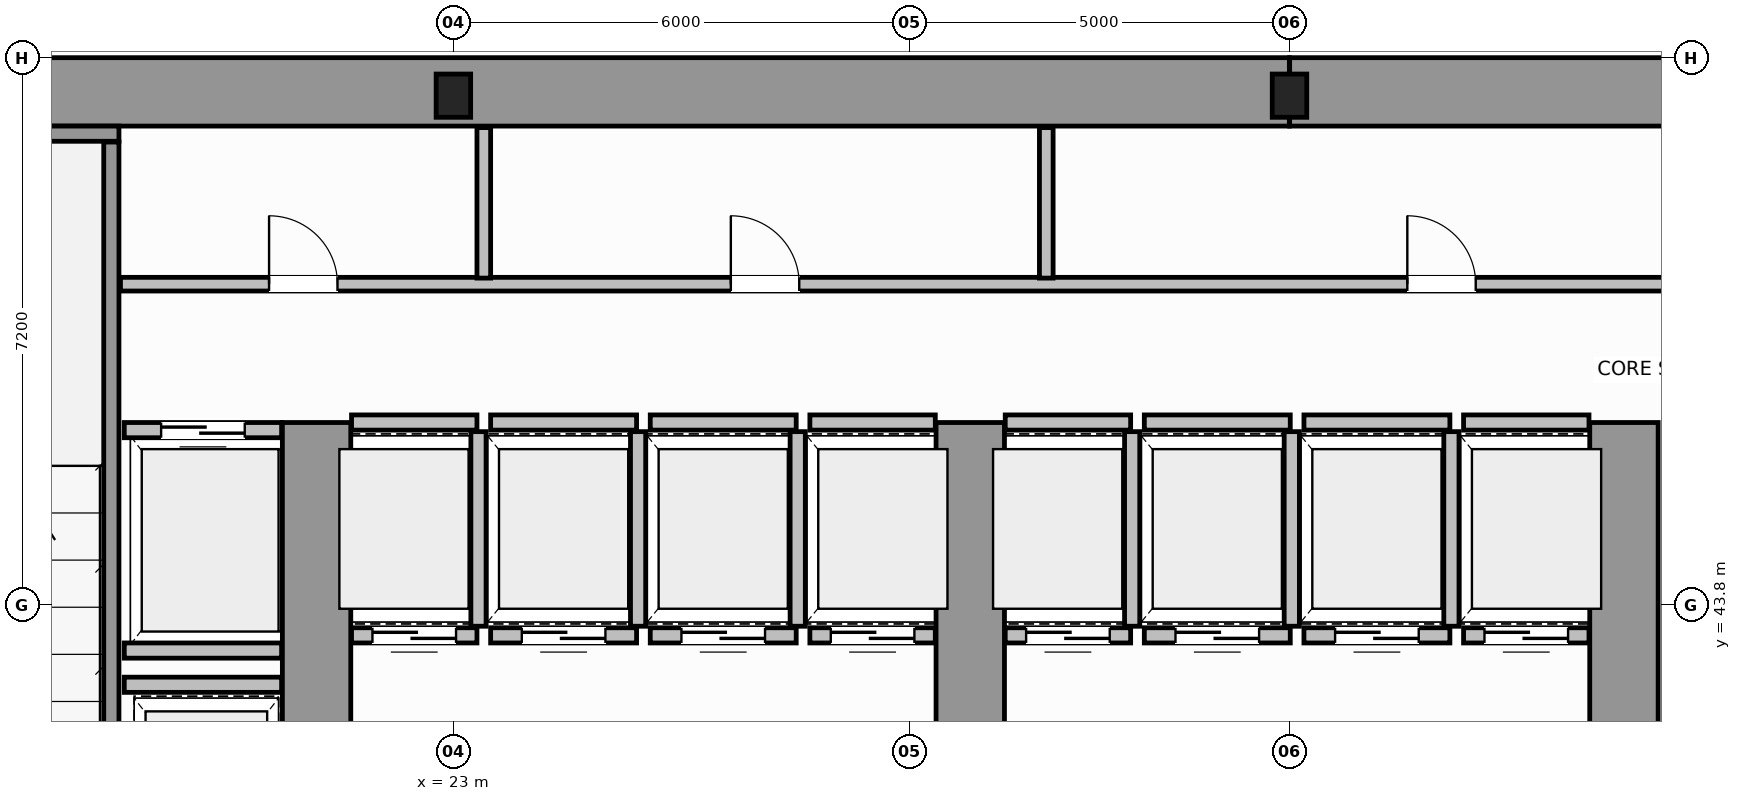
"""IFC4 building model, lengths in metres.
Left out: names, types, materials, properties, quantities, classifications, styles, units other than length and angle.
Written with IfcOpenShell. Run it as: python <this file> out.ifc"""

import sys

from ifc_helpers import new_model, si_unit, direction, frame, frame_2d, origin, origin_2d, place, context, subcontext, project, spatial, rectangle, i_section, extrude, source, transform, mapped, element, fill, save


model = new_model("IFC4")
c1 = context("Model", 3, precision=1e-05, world=origin(), true_north=direction((0.0, 1.0)))
c2 = subcontext(c1, "Body", "Model", "MODEL_VIEW")
j1 = project(units=[si_unit("LENGTHUNIT", "METRE"), si_unit("PLANEANGLEUNIT", "RADIAN")], contexts=[c1])
p1 = place(None, origin())
s1 = spatial("IfcSite", under=j1, at=p1, CompositionType="ELEMENT")
p2 = place(p1, origin())
s2 = spatial("IfcBuilding", under=s1, at=p2, CompositionType="ELEMENT")
p3 = place(p2, frame((0.0, 0.0, 5.6)))
s3 = spatial("IfcBuildingStorey", under=s2, at=p3, CompositionType="ELEMENT", Elevation=5.6)
m1 = source(origin(), c2, "Body", "SweptSolid", [
    extrude(i_section(OverallWidth=0.454, OverallDepth=0.569, WebThickness=0.078, FlangeThickness=0.08, FilletRadius=0.015, at=origin_2d()), origin(), (0.0, 0.0, 1.0), 4.4),
])
for number, where, z_axis, x_axis in (
    (1, (23.0, 50.5, 0.0), (0.0, 0.0, 1.0), (1.0, 0.0, 0.0)),
    (2, (34.0, 50.5, 0.0), (0.0, 0.0, 1.0), (1.0, 0.0, 0.0)),
):
    element("IfcColumn", number, at=place(p3, frame(where, z_axis=z_axis, x_axis=x_axis)), inside=s3, PredefinedType="COLUMN", context=c2, shape_type="MappedRepresentation", body=[
        mapped(m1, transform((0.0, 0.0, 0.0), scale=1.0)),
    ])
for number, where, z_axis, x_axis in (
    (3, (14.454, 50.55, 0.0), (0.0, 0.0, 1.0), (1.0, 0.0, 0.0)),
    (4, (34.002, 50.55, 0.0), (0.0, 0.0, 1.0), (1.0, 0.0, 0.0)),
):
    element("IfcWall", number, at=place(p3, frame(where, z_axis=z_axis, x_axis=x_axis)), inside=s3, PredefinedType="SHEAR", context=c2, shape_type="SweptSolid", body=[
        extrude(rectangle(XDim=19.544, YDim=0.9, at=frame_2d((9.772, 0.0))), origin(), (0.0, 0.0, 1.0), 4.4),
    ])
for number, where, z_axis, x_axis in (
    (5, (21.2, 36.97, 0.0), (0.0, 0.0, 1.0), (0.0, 1.0, 0.0)),
    (6, (29.8, 36.97, 0.0), (0.0, 0.0, 1.0), (0.0, 1.0, 0.0)),
    (7, (38.4, 36.97, 0.0), (0.0, 0.0, 1.0), (0.0, 1.0, 0.0)),
):
    element("IfcWall", number, at=place(p3, frame(where, z_axis=z_axis, x_axis=x_axis)), inside=s3, PredefinedType="SHEAR", context=c2, shape_type="SweptSolid", body=[
        extrude(rectangle(XDim=9.23, YDim=0.9, at=frame_2d((4.615, 0.0))), origin(), (0.0, 0.0, 1.0), 4.4),
    ])
p4 = place(p3, frame((14.45, 50.0, 0.0), z_axis=(0.0, 0.0, 1.0), x_axis=(1.0, 0.0, 0.0)))
e8 = element("IfcWall", 8, at=p4, inside=s3, PredefinedType="SOLIDWALL", context=c2, shape_type="SweptSolid", body=[
    extrude(rectangle(XDim=4.15, YDim=0.2, at=frame_2d((2.075, 0.0))), origin(), (0.0, 0.0, 1.0), 4.4),
])
p5 = place(p3, frame((18.5, 39.96, 0.0), z_axis=(0.0, 0.0, 1.0), x_axis=(0.0, 1.0, 0.0)))
e9 = element("IfcWall", 9, at=p5, inside=s3, PredefinedType="SOLIDWALL", context=c2, shape_type="SweptSolid", body=[
    extrude(rectangle(XDim=9.93, YDim=0.2, at=frame_2d((4.965, 0.0))), origin(), (0.0, 0.0, 1.0), 4.4),
])
p6 = place(p3, frame((21.66, 43.4, 0.0), z_axis=(0.0, 0.0, 1.0), x_axis=(1.0, 0.0, 0.0)))
e10 = element("IfcWall", 10, at=p6, inside=s3, PredefinedType="SOLIDWALL", context=c2, shape_type="SweptSolid", body=[
    extrude(rectangle(XDim=1.65, YDim=0.2, at=frame_2d((0.825, 0.0))), origin(), (0.0, 0.0, 1.0), 4.12),
])
p7 = place(p6, frame((0.275, 0.0, 0.0)))
e11 = element("IfcOpeningElement", 11, at=p7, cuts=e10, PredefinedType="OPENING", context=c2, shape_type="SweptSolid", body=[
    extrude(rectangle(XDim=1.1, YDim=2.15, at=frame_2d((0.55, 1.075))), frame((0.0, 0.11, 0.0), z_axis=(0.0, -1.0, 0.0), x_axis=(1.0, 0.0, 0.0)), (0.0, 0.0, 1.0), 0.22),
])
p8 = place(p3, frame((21.66, 46.2, 0.0), z_axis=(0.0, 0.0, 1.0), x_axis=(1.0, 0.0, 0.0)))
e12 = element("IfcWall", 12, at=p8, inside=s3, PredefinedType="SOLIDWALL", context=c2, shape_type="SweptSolid", body=[
    extrude(rectangle(XDim=1.65, YDim=0.2, at=frame_2d((0.825, 0.0))), origin(), (0.0, 0.0, 1.0), 4.12),
])
p9 = place(p3, frame((23.33, 43.52, 0.0), z_axis=(0.0, 0.0, 1.0), x_axis=(0.0, 1.0, 0.0)))
e13 = element("IfcWall", 13, at=p9, inside=s3, PredefinedType="SOLIDWALL", context=c2, shape_type="SweptSolid", body=[
    extrude(rectangle(XDim=2.56, YDim=0.2, at=frame_2d((1.28, 0.0))), origin(), (0.0, 0.0, 1.0), 4.12),
])
p10 = place(p3, frame((23.49, 43.4, 0.0), z_axis=(0.0, 0.0, 1.0), x_axis=(1.0, 0.0, 0.0)))
e14 = element("IfcWall", 14, at=p10, inside=s3, PredefinedType="SOLIDWALL", context=c2, shape_type="SweptSolid", body=[
    extrude(rectangle(XDim=1.92, YDim=0.2, at=frame_2d((0.96, 0.0))), origin(), (0.0, 0.0, 1.0), 4.12),
])
p11 = place(p10, frame((0.41, 0.0, 0.0)))
e15 = element("IfcOpeningElement", 15, at=p11, cuts=e14, PredefinedType="OPENING", context=c2, shape_type="SweptSolid", body=[
    extrude(rectangle(XDim=1.1, YDim=2.15, at=frame_2d((0.55, 1.075))), frame((0.0, 0.11, 0.0), z_axis=(0.0, -1.0, 0.0), x_axis=(1.0, 0.0, 0.0)), (0.0, 0.0, 1.0), 0.22),
])
p12 = place(p3, frame((23.49, 46.2, 0.0), z_axis=(0.0, 0.0, 1.0), x_axis=(1.0, 0.0, 0.0)))
e16 = element("IfcWall", 16, at=p12, inside=s3, PredefinedType="SOLIDWALL", context=c2, shape_type="SweptSolid", body=[
    extrude(rectangle(XDim=1.92, YDim=0.2, at=frame_2d((0.96, 0.0))), origin(), (0.0, 0.0, 1.0), 4.12),
])
p13 = place(p3, frame((25.43, 43.52, 0.0), z_axis=(0.0, 0.0, 1.0), x_axis=(0.0, 1.0, 0.0)))
e17 = element("IfcWall", 17, at=p13, inside=s3, PredefinedType="SOLIDWALL", context=c2, shape_type="SweptSolid", body=[
    extrude(rectangle(XDim=2.56, YDim=0.2, at=frame_2d((1.28, 0.0))), origin(), (0.0, 0.0, 1.0), 4.12),
])
p14 = place(p3, frame((25.59, 43.4, 0.0), z_axis=(0.0, 0.0, 1.0), x_axis=(1.0, 0.0, 0.0)))
e18 = element("IfcWall", 18, at=p14, inside=s3, PredefinedType="SOLIDWALL", context=c2, shape_type="SweptSolid", body=[
    extrude(rectangle(XDim=1.92, YDim=0.2, at=frame_2d((0.96, 0.0))), origin(), (0.0, 0.0, 1.0), 4.12),
])
p15 = place(p14, frame((0.41, 0.0, 0.0)))
e19 = element("IfcOpeningElement", 19, at=p15, cuts=e18, PredefinedType="OPENING", context=c2, shape_type="SweptSolid", body=[
    extrude(rectangle(XDim=1.1, YDim=2.15, at=frame_2d((0.55, 1.075))), frame((0.0, 0.11, 0.0), z_axis=(0.0, -1.0, 0.0), x_axis=(1.0, 0.0, 0.0)), (0.0, 0.0, 1.0), 0.22),
])
p16 = place(p3, frame((25.59, 46.2, 0.0), z_axis=(0.0, 0.0, 1.0), x_axis=(1.0, 0.0, 0.0)))
e20 = element("IfcWall", 20, at=p16, inside=s3, PredefinedType="SOLIDWALL", context=c2, shape_type="SweptSolid", body=[
    extrude(rectangle(XDim=1.92, YDim=0.2, at=frame_2d((0.96, 0.0))), origin(), (0.0, 0.0, 1.0), 4.12),
])
p17 = place(p3, frame((27.53, 43.52, 0.0), z_axis=(0.0, 0.0, 1.0), x_axis=(0.0, 1.0, 0.0)))
e21 = element("IfcWall", 21, at=p17, inside=s3, PredefinedType="SOLIDWALL", context=c2, shape_type="SweptSolid", body=[
    extrude(rectangle(XDim=2.56, YDim=0.2, at=frame_2d((1.28, 0.0))), origin(), (0.0, 0.0, 1.0), 4.12),
])
p18 = place(p3, frame((27.69, 43.4, 0.0), z_axis=(0.0, 0.0, 1.0), x_axis=(1.0, 0.0, 0.0)))
e22 = element("IfcWall", 22, at=p18, inside=s3, PredefinedType="SOLIDWALL", context=c2, shape_type="SweptSolid", body=[
    extrude(rectangle(XDim=1.65, YDim=0.2, at=frame_2d((0.825, 0.0))), origin(), (0.0, 0.0, 1.0), 4.12),
])
p19 = place(p18, frame((0.275, 0.0, 0.0)))
e23 = element("IfcOpeningElement", 23, at=p19, cuts=e22, PredefinedType="OPENING", context=c2, shape_type="SweptSolid", body=[
    extrude(rectangle(XDim=1.1, YDim=2.15, at=frame_2d((0.55, 1.075))), frame((0.0, 0.11, 0.0), z_axis=(0.0, -1.0, 0.0), x_axis=(1.0, 0.0, 0.0)), (0.0, 0.0, 1.0), 0.22),
])
p20 = place(p3, frame((27.69, 46.2, 0.0), z_axis=(0.0, 0.0, 1.0), x_axis=(1.0, 0.0, 0.0)))
e24 = element("IfcWall", 24, at=p20, inside=s3, PredefinedType="SOLIDWALL", context=c2, shape_type="SweptSolid", body=[
    extrude(rectangle(XDim=1.65, YDim=0.2, at=frame_2d((0.825, 0.0))), origin(), (0.0, 0.0, 1.0), 4.12),
])
p21 = place(p3, frame((30.26, 43.4, 0.0), z_axis=(0.0, 0.0, 1.0), x_axis=(1.0, 0.0, 0.0)))
e25 = element("IfcWall", 25, at=p21, inside=s3, PredefinedType="SOLIDWALL", context=c2, shape_type="SweptSolid", body=[
    extrude(rectangle(XDim=1.65, YDim=0.2, at=frame_2d((0.825, 0.0))), origin(), (0.0, 0.0, 1.0), 4.12),
])
p22 = place(p21, frame((0.275, 0.0, 0.0)))
e26 = element("IfcOpeningElement", 26, at=p22, cuts=e25, PredefinedType="OPENING", context=c2, shape_type="SweptSolid", body=[
    extrude(rectangle(XDim=1.1, YDim=2.15, at=frame_2d((0.55, 1.075))), frame((0.0, 0.11, 0.0), z_axis=(0.0, -1.0, 0.0), x_axis=(1.0, 0.0, 0.0)), (0.0, 0.0, 1.0), 0.22),
])
p23 = place(p3, frame((30.26, 46.2, 0.0), z_axis=(0.0, 0.0, 1.0), x_axis=(1.0, 0.0, 0.0)))
e27 = element("IfcWall", 27, at=p23, inside=s3, PredefinedType="SOLIDWALL", context=c2, shape_type="SweptSolid", body=[
    extrude(rectangle(XDim=1.65, YDim=0.2, at=frame_2d((0.825, 0.0))), origin(), (0.0, 0.0, 1.0), 4.12),
])
p24 = place(p3, frame((31.93, 43.52, 0.0), z_axis=(0.0, 0.0, 1.0), x_axis=(0.0, 1.0, 0.0)))
e28 = element("IfcWall", 28, at=p24, inside=s3, PredefinedType="SOLIDWALL", context=c2, shape_type="SweptSolid", body=[
    extrude(rectangle(XDim=2.56, YDim=0.2, at=frame_2d((1.28, 0.0))), origin(), (0.0, 0.0, 1.0), 4.12),
])
p25 = place(p3, frame((32.09, 43.4, 0.0), z_axis=(0.0, 0.0, 1.0), x_axis=(1.0, 0.0, 0.0)))
e29 = element("IfcWall", 29, at=p25, inside=s3, PredefinedType="SOLIDWALL", context=c2, shape_type="SweptSolid", body=[
    extrude(rectangle(XDim=1.92, YDim=0.2, at=frame_2d((0.96, 0.0))), origin(), (0.0, 0.0, 1.0), 4.12),
])
p26 = place(p25, frame((0.41, 0.0, 0.0)))
e30 = element("IfcOpeningElement", 30, at=p26, cuts=e29, PredefinedType="OPENING", context=c2, shape_type="SweptSolid", body=[
    extrude(rectangle(XDim=1.1, YDim=2.15, at=frame_2d((0.55, 1.075))), frame((0.0, 0.11, 0.0), z_axis=(0.0, -1.0, 0.0), x_axis=(1.0, 0.0, 0.0)), (0.0, 0.0, 1.0), 0.22),
])
p27 = place(p3, frame((32.09, 46.2, 0.0), z_axis=(0.0, 0.0, 1.0), x_axis=(1.0, 0.0, 0.0)))
e31 = element("IfcWall", 31, at=p27, inside=s3, PredefinedType="SOLIDWALL", context=c2, shape_type="SweptSolid", body=[
    extrude(rectangle(XDim=1.92, YDim=0.2, at=frame_2d((0.96, 0.0))), origin(), (0.0, 0.0, 1.0), 4.12),
])
p28 = place(p3, frame((34.03, 43.52, 0.0), z_axis=(0.0, 0.0, 1.0), x_axis=(0.0, 1.0, 0.0)))
e32 = element("IfcWall", 32, at=p28, inside=s3, PredefinedType="SOLIDWALL", context=c2, shape_type="SweptSolid", body=[
    extrude(rectangle(XDim=2.56, YDim=0.2, at=frame_2d((1.28, 0.0))), origin(), (0.0, 0.0, 1.0), 4.12),
])
p29 = place(p3, frame((34.19, 43.4, 0.0), z_axis=(0.0, 0.0, 1.0), x_axis=(1.0, 0.0, 0.0)))
e33 = element("IfcWall", 33, at=p29, inside=s3, PredefinedType="SOLIDWALL", context=c2, shape_type="SweptSolid", body=[
    extrude(rectangle(XDim=1.92, YDim=0.2, at=frame_2d((0.96, 0.0))), origin(), (0.0, 0.0, 1.0), 4.12),
])
p30 = place(p29, frame((0.41, 0.0, 0.0)))
e34 = element("IfcOpeningElement", 34, at=p30, cuts=e33, PredefinedType="OPENING", context=c2, shape_type="SweptSolid", body=[
    extrude(rectangle(XDim=1.1, YDim=2.15, at=frame_2d((0.55, 1.075))), frame((0.0, 0.11, 0.0), z_axis=(0.0, -1.0, 0.0), x_axis=(1.0, 0.0, 0.0)), (0.0, 0.0, 1.0), 0.22),
])
p31 = place(p3, frame((34.19, 46.2, 0.0), z_axis=(0.0, 0.0, 1.0), x_axis=(1.0, 0.0, 0.0)))
e35 = element("IfcWall", 35, at=p31, inside=s3, PredefinedType="SOLIDWALL", context=c2, shape_type="SweptSolid", body=[
    extrude(rectangle(XDim=1.92, YDim=0.2, at=frame_2d((0.96, 0.0))), origin(), (0.0, 0.0, 1.0), 4.12),
])
p32 = place(p3, frame((36.13, 43.52, 0.0), z_axis=(0.0, 0.0, 1.0), x_axis=(0.0, 1.0, 0.0)))
e36 = element("IfcWall", 36, at=p32, inside=s3, PredefinedType="SOLIDWALL", context=c2, shape_type="SweptSolid", body=[
    extrude(rectangle(XDim=2.56, YDim=0.2, at=frame_2d((1.28, 0.0))), origin(), (0.0, 0.0, 1.0), 4.12),
])
p33 = place(p3, frame((36.29, 43.4, 0.0), z_axis=(0.0, 0.0, 1.0), x_axis=(1.0, 0.0, 0.0)))
e37 = element("IfcWall", 37, at=p33, inside=s3, PredefinedType="SOLIDWALL", context=c2, shape_type="SweptSolid", body=[
    extrude(rectangle(XDim=1.65, YDim=0.2, at=frame_2d((0.825, 0.0))), origin(), (0.0, 0.0, 1.0), 4.12),
])
p34 = place(p33, frame((0.275, 0.0, 0.0)))
e38 = element("IfcOpeningElement", 38, at=p34, cuts=e37, PredefinedType="OPENING", context=c2, shape_type="SweptSolid", body=[
    extrude(rectangle(XDim=1.1, YDim=2.15, at=frame_2d((0.55, 1.075))), frame((0.0, 0.11, 0.0), z_axis=(0.0, -1.0, 0.0), x_axis=(1.0, 0.0, 0.0)), (0.0, 0.0, 1.0), 0.22),
])
p35 = place(p3, frame((36.29, 46.2, 0.0), z_axis=(0.0, 0.0, 1.0), x_axis=(1.0, 0.0, 0.0)))
e39 = element("IfcWall", 39, at=p35, inside=s3, PredefinedType="SOLIDWALL", context=c2, shape_type="SweptSolid", body=[
    extrude(rectangle(XDim=1.65, YDim=0.2, at=frame_2d((0.825, 0.0))), origin(), (0.0, 0.0, 1.0), 4.12),
])
p36 = place(p3, frame((18.67, 46.1, 0.0), z_axis=(0.0, 0.0, 1.0), x_axis=(1.0, 0.0, 0.0)))
e40 = element("IfcWall", 40, at=p36, inside=s3, PredefinedType="SOLIDWALL", context=c2, shape_type="SweptSolid", body=[
    extrude(rectangle(XDim=2.07, YDim=0.2, at=frame_2d((1.035, 0.0))), origin(), (0.0, 0.0, 1.0), 4.12),
])
p37 = place(p36, frame((0.485, 0.0, 0.0)))
e41 = element("IfcOpeningElement", 41, at=p37, cuts=e40, PredefinedType="OPENING", context=c2, shape_type="SweptSolid", body=[
    extrude(rectangle(XDim=1.1, YDim=2.15, at=frame_2d((0.55, 1.075))), frame((0.0, 0.11, 0.0), z_axis=(0.0, -1.0, 0.0), x_axis=(1.0, 0.0, 0.0)), (0.0, 0.0, 1.0), 0.22),
])
for number, where, z_axis, x_axis in (
    (42, (18.67, 43.2, 0.0), (0.0, 0.0, 1.0), (1.0, 0.0, 0.0)),
    (43, (18.67, 42.75, 0.0), (0.0, 0.0, 1.0), (1.0, 0.0, 0.0)),
):
    element("IfcWall", number, at=place(p3, frame(where, z_axis=z_axis, x_axis=x_axis)), inside=s3, PredefinedType="SOLIDWALL", context=c2, shape_type="SweptSolid", body=[
        extrude(rectangle(XDim=2.07, YDim=0.2, at=frame_2d((1.035, 0.0))), origin(), (0.0, 0.0, 1.0), 4.12),
    ])
p38 = place(p3, frame((18.62, 48.02, 0.0), z_axis=(0.0, 0.0, 1.0), x_axis=(1.0, 0.0, 0.0)))
e44 = element("IfcWall", 44, at=p38, inside=s3, PredefinedType="PLUMBINGWALL", context=c2, shape_type="SweptSolid", body=[
    extrude(rectangle(XDim=30.76, YDim=0.18, at=frame_2d((15.38, 0.0))), origin(), (0.0, 0.0, 1.0), 4.12),
])
p39 = place(p38, frame((1.955, 0.0, 0.0)))
e45 = element("IfcOpeningElement", 45, at=p39, cuts=e44, PredefinedType="OPENING", context=c2, shape_type="SweptSolid", body=[
    extrude(rectangle(XDim=0.9, YDim=2.15, at=frame_2d((0.45, 1.075))), frame((0.0, 0.1, 0.0), z_axis=(0.0, -1.0, 0.0), x_axis=(1.0, 0.0, 0.0)), (0.0, 0.0, 1.0), 0.2),
])
p40 = place(p38, frame((8.03, 0.0, 0.0)))
e46 = element("IfcOpeningElement", 46, at=p40, cuts=e44, PredefinedType="OPENING", context=c2, shape_type="SweptSolid", body=[
    extrude(rectangle(XDim=0.9, YDim=2.15, at=frame_2d((0.45, 1.075))), frame((0.0, 0.1, 0.0), z_axis=(0.0, -1.0, 0.0), x_axis=(1.0, 0.0, 0.0)), (0.0, 0.0, 1.0), 0.2),
])
p41 = place(p38, frame((16.93, 0.0, 0.0)))
e47 = element("IfcOpeningElement", 47, at=p41, cuts=e44, PredefinedType="OPENING", context=c2, shape_type="SweptSolid", body=[
    extrude(rectangle(XDim=0.9, YDim=2.15, at=frame_2d((0.45, 1.075))), frame((0.0, 0.1, 0.0), z_axis=(0.0, -1.0, 0.0), x_axis=(1.0, 0.0, 0.0)), (0.0, 0.0, 1.0), 0.2),
])
p42 = place(p38, frame((26.205, 0.0, 0.0)))
e48 = element("IfcOpeningElement", 48, at=p42, cuts=e44, PredefinedType="OPENING", context=c2, shape_type="SweptSolid", body=[
    extrude(rectangle(XDim=0.9, YDim=2.15, at=frame_2d((0.45, 1.075))), frame((0.0, 0.1, 0.0), z_axis=(0.0, -1.0, 0.0), x_axis=(1.0, 0.0, 0.0)), (0.0, 0.0, 1.0), 0.2),
])
for number, where, z_axis, x_axis in (
    (49, (23.4, 48.1, 0.0), (0.0, 0.0, 1.0), (0.0, 1.0, 0.0)),
    (50, (30.8, 48.1, 0.0), (0.0, 0.0, 1.0), (0.0, 1.0, 0.0)),
):
    element("IfcWall", number, at=place(p3, frame(where, z_axis=z_axis, x_axis=x_axis)), inside=s3, PredefinedType="PLUMBINGWALL", context=c2, shape_type="SweptSolid", body=[
        extrude(rectangle(XDim=1.98, YDim=0.18, at=frame_2d((0.99, 0.0))), origin(), (0.0, 0.0, 1.0), 4.12),
    ])
m2 = source(origin(), c2, "Body", "SweptSolid", [
    extrude(rectangle(XDim=1.1, YDim=2.15, at=frame_2d((0.55, 1.075))), frame((0.0, 0.025, 0.0), z_axis=(0.0, -1.0, 0.0), x_axis=(1.0, 0.0, 0.0)), (0.0, 0.0, 1.0), 0.05),
])
p43 = place(p7, origin())
e51 = element("IfcDoor", 51, at=p43, inside=s3, OperationType="DOUBLE_DOOR_SLIDING", PredefinedType="DOOR", context=c2, shape_type="MappedRepresentation", body=[
    mapped(m2, transform((0.0, 0.0, 0.0), scale=1.0)),
])
fill(e11, e51)
p44 = place(p11, origin())
e52 = element("IfcDoor", 52, at=p44, inside=s3, OperationType="DOUBLE_DOOR_SLIDING", PredefinedType="DOOR", context=c2, shape_type="MappedRepresentation", body=[
    mapped(m2, transform((0.0, 0.0, 0.0), scale=1.0)),
])
fill(e15, e52)
p45 = place(p15, origin())
e53 = element("IfcDoor", 53, at=p45, inside=s3, OperationType="DOUBLE_DOOR_SLIDING", PredefinedType="DOOR", context=c2, shape_type="MappedRepresentation", body=[
    mapped(m2, transform((0.0, 0.0, 0.0), scale=1.0)),
])
fill(e19, e53)
p46 = place(p19, origin())
e54 = element("IfcDoor", 54, at=p46, inside=s3, OperationType="DOUBLE_DOOR_SLIDING", PredefinedType="DOOR", context=c2, shape_type="MappedRepresentation", body=[
    mapped(m2, transform((0.0, 0.0, 0.0), scale=1.0)),
])
fill(e23, e54)
p47 = place(p22, origin())
e55 = element("IfcDoor", 55, at=p47, inside=s3, OperationType="DOUBLE_DOOR_SLIDING", PredefinedType="DOOR", context=c2, shape_type="MappedRepresentation", body=[
    mapped(m2, transform((0.0, 0.0, 0.0), scale=1.0)),
])
fill(e26, e55)
p48 = place(p26, origin())
e56 = element("IfcDoor", 56, at=p48, inside=s3, OperationType="DOUBLE_DOOR_SLIDING", PredefinedType="DOOR", context=c2, shape_type="MappedRepresentation", body=[
    mapped(m2, transform((0.0, 0.0, 0.0), scale=1.0)),
])
fill(e30, e56)
p49 = place(p30, origin())
e57 = element("IfcDoor", 57, at=p49, inside=s3, OperationType="DOUBLE_DOOR_SLIDING", PredefinedType="DOOR", context=c2, shape_type="MappedRepresentation", body=[
    mapped(m2, transform((0.0, 0.0, 0.0), scale=1.0)),
])
fill(e34, e57)
p50 = place(p34, origin())
e58 = element("IfcDoor", 58, at=p50, inside=s3, OperationType="DOUBLE_DOOR_SLIDING", PredefinedType="DOOR", context=c2, shape_type="MappedRepresentation", body=[
    mapped(m2, transform((0.0, 0.0, 0.0), scale=1.0)),
])
fill(e38, e58)
p51 = place(p37, origin())
e59 = element("IfcDoor", 59, at=p51, inside=s3, OperationType="DOUBLE_DOOR_SLIDING", PredefinedType="DOOR", context=c2, shape_type="MappedRepresentation", body=[
    mapped(m2, transform((0.0, 0.0, 0.0), scale=1.0)),
])
fill(e41, e59)
m3 = source(origin(), c2, "Body", "SweptSolid", [
    extrude(rectangle(XDim=0.9, YDim=2.15, at=frame_2d((0.45, 1.075))), frame((0.0, 0.025, 0.0), z_axis=(0.0, -1.0, 0.0), x_axis=(1.0, 0.0, 0.0)), (0.0, 0.0, 1.0), 0.05),
])
p52 = place(p39, origin())
e60 = element("IfcDoor", 60, at=p52, inside=s3, OperationType="SINGLE_SWING_LEFT", PredefinedType="DOOR", context=c2, shape_type="MappedRepresentation", body=[
    mapped(m3, transform((0.0, 0.0, 0.0), scale=1.0)),
])
fill(e45, e60)
p53 = place(p40, origin())
e61 = element("IfcDoor", 61, at=p53, inside=s3, OperationType="SINGLE_SWING_RIGHT", PredefinedType="DOOR", context=c2, shape_type="MappedRepresentation", body=[
    mapped(m3, transform((0.0, 0.0, 0.0), scale=1.0)),
])
fill(e46, e61)
p54 = place(p41, origin())
e62 = element("IfcDoor", 62, at=p54, inside=s3, OperationType="SINGLE_SWING_LEFT", PredefinedType="DOOR", context=c2, shape_type="MappedRepresentation", body=[
    mapped(m3, transform((0.0, 0.0, 0.0), scale=1.0)),
])
fill(e47, e62)
save(model, sys.argv[1])
